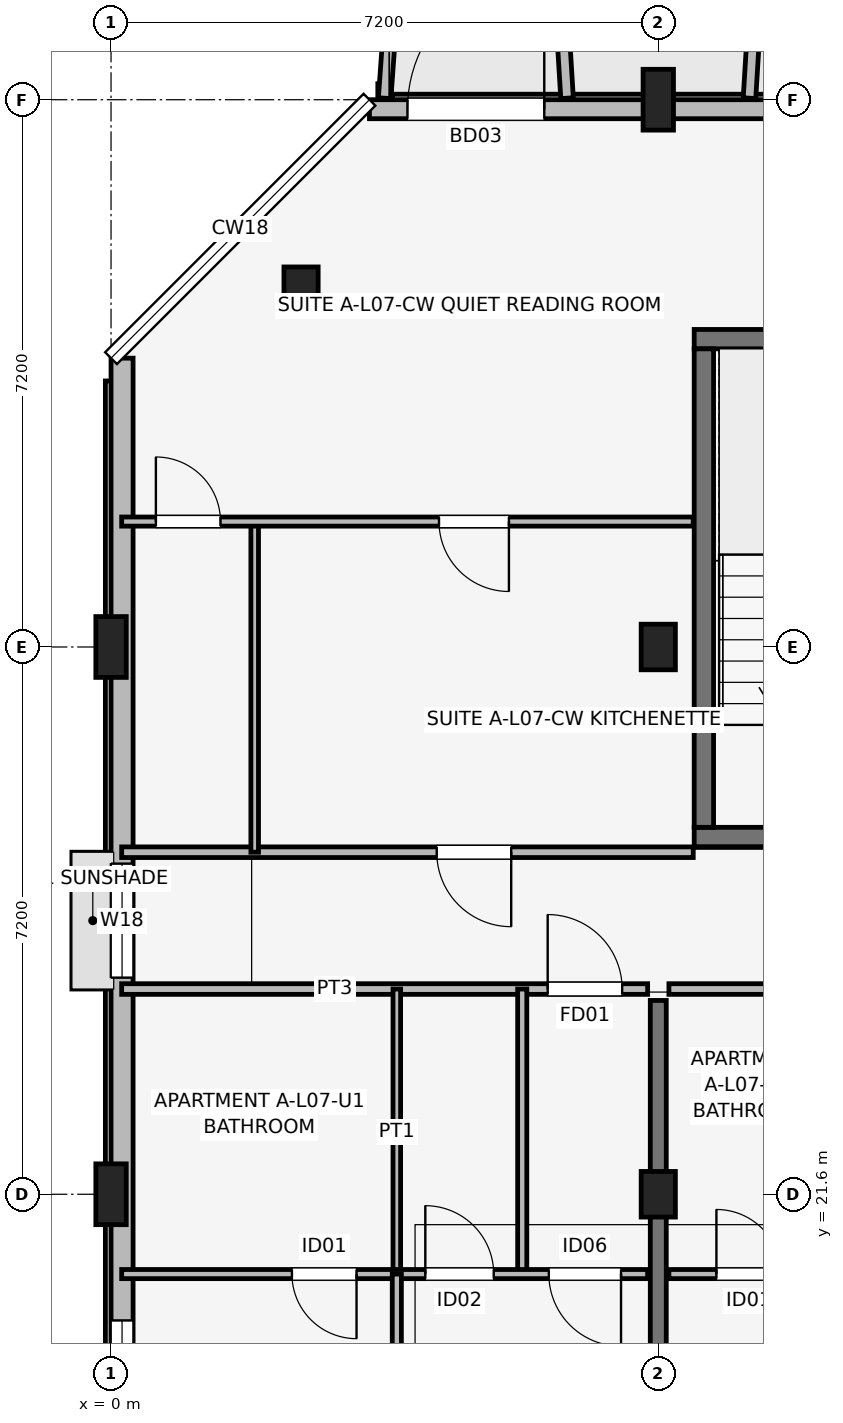
"""IFC4 building model, lengths in metres.
Left out: names, types, materials, properties, quantities, classifications, styles, units other than length and angle.
Written with IfcOpenShell. Run it as: python <this file> out.ifc"""

import sys

from ifc_helpers import new_model, si_unit, direction, frame, frame_2d, origin, origin_2d, place, context, subcontext, project, spatial, rectangle, extrude, element, fill, save


model = new_model("IFC4")
c1 = context("Model", 3, precision=1e-05, world=origin(), true_north=direction((0.0, 1.0)))
c2 = subcontext(c1, "Body", "Model", "MODEL_VIEW")
j1 = project(units=[si_unit("LENGTHUNIT", "METRE"), si_unit("PLANEANGLEUNIT", "RADIAN")], contexts=[c1])
p1 = place(None, origin())
s1 = spatial("IfcSite", under=j1, at=p1, CompositionType="ELEMENT")
p2 = place(p1, origin())
s2 = spatial("IfcBuilding", under=s1, at=p2, CompositionType="ELEMENT")
p3 = place(p2, frame((0.0, 0.0, 24.45)))
s3 = spatial("IfcBuildingStorey", under=s2, at=p3, CompositionType="ELEMENT", Elevation=24.45)
for number, where, z_axis, x_axis in (
    (1, (0.0, 21.6, 0.0), (0.0, 0.0, 1.0), (1.0, 0.0, 0.0)),
    (2, (0.0, 28.8, 0.0), (0.0, 0.0, 1.0), (1.0, 0.0, 0.0)),
):
    element("IfcColumn", number, at=place(p3, frame(where, z_axis=z_axis, x_axis=x_axis)), inside=s3, PredefinedType="COLUMN", context=c2, shape_type="SweptSolid", body=[
        extrude(rectangle(XDim=0.4, YDim=0.8, at=origin_2d()), origin(), (0.0, 0.0, 1.0), 3.15),
    ])
for number, where, z_axis, x_axis in (
    (3, (2.5, 33.5, 0.0), (0.0, 0.0, 1.0), (1.0, 0.0, 0.0)),
    (4, (7.2, 21.6, 0.0), (0.0, 0.0, 1.0), (1.0, 0.0, 0.0)),
    (5, (7.2, 28.8, 0.0), (0.0, 0.0, 1.0), (1.0, 0.0, 0.0)),
):
    element("IfcColumn", number, at=place(p3, frame(where, z_axis=z_axis, x_axis=x_axis)), inside=s3, PredefinedType="COLUMN", context=c2, shape_type="SweptSolid", body=[
        extrude(rectangle(XDim=0.45, YDim=0.6, at=origin_2d()), origin(), (0.0, 0.0, 1.0), 3.15),
    ])
p4 = place(p3, frame((7.2, 36.0, 0.0), z_axis=(0.0, 0.0, 1.0), x_axis=(1.0, 0.0, 0.0)))
e6 = element("IfcColumn", 6, at=p4, inside=s3, PredefinedType="COLUMN", context=c2, shape_type="SweptSolid", body=[
    extrude(rectangle(XDim=0.4, YDim=0.8, at=origin_2d()), origin(), (0.0, 0.0, 1.0), 3.15),
])
p5 = place(p3, frame((7.673, 26.3, 0.0), z_axis=(0.0, 0.0, 1.0), x_axis=(1.0, 0.0, 0.0)))
e7 = element("IfcWall", 7, at=p5, inside=s3, PredefinedType="SHEAR", context=c2, shape_type="SweptSolid", body=[
    extrude(rectangle(XDim=3.305, YDim=0.255, at=frame_2d((1.652, 0.0))), origin(), (0.0, 0.0, 1.0), 3.15),
])
p6 = place(p5, frame((2.177, 0.0, 0.0), z_axis=(0.0, 0.0, 1.0), x_axis=(-1.0, 0.0, 0.0)))
e8 = element("IfcOpeningElement", 8, at=p6, cuts=e7, PredefinedType="OPENING", context=c2, shape_type="SweptSolid", body=[
    extrude(rectangle(XDim=1.05, YDim=2.12, at=frame_2d((0.525, 1.06))), frame((0.0, 0.137, 0.0), z_axis=(0.0, -1.0, 0.0), x_axis=(1.0, 0.0, 0.0)), (0.0, 0.0, 1.0), 0.275),
])
p7 = place(p3, frame((7.673, 32.85, 0.0), z_axis=(0.0, 0.0, 1.0), x_axis=(1.0, 0.0, 0.0)))
e9 = element("IfcWall", 9, at=p7, inside=s3, PredefinedType="SHEAR", context=c2, shape_type="SweptSolid", body=[
    extrude(rectangle(XDim=3.305, YDim=0.255, at=frame_2d((1.652, 0.0))), origin(), (0.0, 0.0, 1.0), 3.15),
])
p8 = place(p3, frame((7.8, 26.427, 0.0), z_axis=(0.0, 0.0, 1.0), x_axis=(0.0, 1.0, 0.0)))
e10 = element("IfcWall", 10, at=p8, inside=s3, PredefinedType="SHEAR", context=c2, shape_type="SweptSolid", body=[
    extrude(rectangle(XDim=6.295, YDim=0.255, at=frame_2d((3.147, 0.0))), origin(), (0.0, 0.0, 1.0), 3.15),
])
p9 = place(p3, frame((7.2, 14.75, 0.0), z_axis=(0.0, 0.0, 1.0), x_axis=(0.0, 1.0, 0.0)))
e11 = element("IfcWall", 11, at=p9, inside=s3, PredefinedType="SHEAR", context=c2, shape_type="SweptSolid", body=[
    extrude(rectangle(XDim=9.4, YDim=0.21, at=frame_2d((4.7, 0.0))), origin(), (0.0, 0.0, 1.0), 3.15),
])
p10 = place(p3, frame((32.6, 35.875, 0.0), z_axis=(0.0, 0.0, 1.0), x_axis=(-1.0, 0.0, 0.0)))
e12 = element("IfcWall", 12, at=p10, inside=s3, PredefinedType="SOLIDWALL", context=c2, shape_type="SweptSolid", body=[
    extrude(rectangle(XDim=29.2, YDim=0.25, at=frame_2d((14.6, 0.0))), origin(), (0.0, 0.0, 1.0), 2.43),
])
p11 = place(p10, frame((28.7, 0.0, 0.0), z_axis=(0.0, 0.0, 1.0), x_axis=(-1.0, 0.0, 0.0)))
e13 = element("IfcOpeningElement", 13, at=p11, cuts=e12, PredefinedType="OPENING", context=c2, shape_type="SweptSolid", body=[
    extrude(rectangle(XDim=1.8, YDim=2.15, at=frame_2d((0.9, 1.075))), frame((0.0, 0.135, 0.0), z_axis=(0.0, -1.0, 0.0), x_axis=(1.0, 0.0, 0.0)), (0.0, 0.0, 1.0), 0.27),
])
p12 = place(p10, frame((2.15, 0.0, 0.0), z_axis=(0.0, 0.0, 1.0), x_axis=(-1.0, 0.0, 0.0)))
e14 = element("IfcOpeningElement", 14, at=p12, cuts=e12, PredefinedType="OPENING", context=c2, shape_type="SweptSolid", body=[
    extrude(rectangle(XDim=1.5, YDim=2.15, at=frame_2d((0.75, 1.075))), frame((0.0, 0.135, 0.0), z_axis=(0.0, -1.0, 0.0), x_axis=(1.0, 0.0, 0.0)), (0.0, 0.0, 1.0), 0.27),
])
p13 = place(p10, frame((14.955, 0.0, 0.5)))
e15 = element("IfcOpeningElement", 15, at=p13, cuts=e12, PredefinedType="OPENING", context=c2, shape_type="SweptSolid", body=[
    extrude(rectangle(XDim=0.9, YDim=1.8, at=frame_2d((0.45, 0.9))), frame((0.0, 0.135, 0.0), z_axis=(0.0, -1.0, 0.0), x_axis=(1.0, 0.0, 0.0)), (0.0, 0.0, 1.0), 0.27),
])
p14 = place(p10, frame((7.745, 0.0, 0.7)))
e16 = element("IfcOpeningElement", 16, at=p14, cuts=e12, PredefinedType="OPENING", context=c2, shape_type="SweptSolid", body=[
    extrude(rectangle(XDim=1.86, YDim=1.6, at=frame_2d((0.93, 0.8))), frame((0.0, 0.135, 0.0), z_axis=(0.0, -1.0, 0.0), x_axis=(1.0, 0.0, 0.0)), (0.0, 0.0, 1.0), 0.27),
])
p15 = place(p10, frame((19.57, 0.0, 0.7)))
e17 = element("IfcOpeningElement", 17, at=p15, cuts=e12, PredefinedType="OPENING", context=c2, shape_type="SweptSolid", body=[
    extrude(rectangle(XDim=1.86, YDim=1.6, at=frame_2d((0.93, 0.8))), frame((0.0, 0.135, 0.0), z_axis=(0.0, -1.0, 0.0), x_axis=(1.0, 0.0, 0.0)), (0.0, 0.0, 1.0), 0.27),
])
p16 = place(p3, frame((0.145, 32.6, 0.0), z_axis=(0.0, 0.0, 1.0), x_axis=(0.0, -1.0, 0.0)))
e18 = element("IfcWall", 18, at=p16, inside=s3, PredefinedType="SOLIDWALL", context=c2, shape_type="SweptSolid", body=[
    extrude(rectangle(XDim=14.8, YDim=0.29, at=frame_2d((7.4, 0.0))), origin(), (0.0, 0.0, 1.0), 2.43),
])
p17 = place(p16, frame((6.65, 0.0, 1.05)))
e19 = element("IfcOpeningElement", 19, at=p17, cuts=e18, PredefinedType="OPENING", context=c2, shape_type="SweptSolid", body=[
    extrude(rectangle(XDim=1.5, YDim=1.15, at=frame_2d((0.75, 0.575))), frame((0.0, 0.155, 0.0), z_axis=(0.0, -1.0, 0.0), x_axis=(1.0, 0.0, 0.0)), (0.0, 0.0, 1.0), 0.31),
])
p18 = place(p16, frame((12.66, 0.0, 0.75)))
e20 = element("IfcOpeningElement", 20, at=p18, cuts=e18, PredefinedType="OPENING", context=c2, shape_type="SweptSolid", body=[
    extrude(rectangle(XDim=1.3, YDim=1.55, at=frame_2d((0.65, 0.775))), frame((0.0, 0.155, 0.0), z_axis=(0.0, -1.0, 0.0), x_axis=(1.0, 0.0, 0.0)), (0.0, 0.0, 1.0), 0.31),
])
p19 = place(p3, frame((3.6, 36.02, 0.0), z_axis=(0.0, 0.0, 1.0), x_axis=(0.071194071069, 0.997462482625, 0.0)))
e21 = element("IfcWall", 21, at=p19, inside=s3, PredefinedType="ELEMENTEDWALL", context=c2, shape_type="SweptSolid", body=[
    extrude(rectangle(XDim=1.965, YDim=0.165, at=frame_2d((0.982, 0.0))), origin(), (0.0, 0.0, 1.0), 2.8),
])
p20 = place(p3, frame((6.0, 36.02, 0.0), z_axis=(0.0, 0.0, 1.0), x_axis=(-0.061170732449, 0.998127317276, 0.0)))
e22 = element("IfcWall", 22, at=p20, inside=s3, PredefinedType="ELEMENTEDWALL", context=c2, shape_type="SweptSolid", body=[
    extrude(rectangle(XDim=1.964, YDim=0.165, at=frame_2d((0.982, 0.0))), origin(), (0.0, 0.0, 1.0), 2.8),
])
p21 = place(p3, frame((8.4, 36.02, 0.0), z_axis=(0.0, 0.0, 1.0), x_axis=(0.061170732449, 0.998127317276, 0.0)))
e23 = element("IfcWall", 23, at=p21, inside=s3, PredefinedType="ELEMENTEDWALL", context=c2, shape_type="SweptSolid", body=[
    extrude(rectangle(XDim=1.964, YDim=0.165, at=frame_2d((0.982, 0.0))), origin(), (0.0, 0.0, 1.0), 2.53),
])
p22 = place(p3, frame((0.14, 24.3, 0.0), z_axis=(0.0, 0.0, 1.0), x_axis=(1.0, 0.0, 0.0)))
e24 = element("IfcWall", 24, at=p22, inside=s3, PredefinedType="PARTITIONING", context=c2, shape_type="SweptSolid", body=[
    extrude(rectangle(XDim=6.92, YDim=0.14, at=frame_2d((3.46, 0.0))), origin(), (0.0, 0.0, 1.0), 2.38),
])
p23 = place(p22, frame((5.605, 0.0, 0.0)))
e25 = element("IfcOpeningElement", 25, at=p23, cuts=e24, PredefinedType="OPENING", context=c2, shape_type="SweptSolid", body=[
    extrude(rectangle(XDim=0.98, YDim=2.1, at=frame_2d((0.49, 1.05))), frame((0.0, 0.08, 0.0), z_axis=(0.0, -1.0, 0.0), x_axis=(1.0, 0.0, 0.0)), (0.0, 0.0, 1.0), 0.16),
])
p24 = place(p3, frame((3.76, 20.55, 0.0), z_axis=(0.0, 0.0, 1.0), x_axis=(0.0, 1.0, 0.0)))
e26 = element("IfcWall", 26, at=p24, inside=s3, PredefinedType="PARTITIONING", context=c2, shape_type="SweptSolid", body=[
    extrude(rectangle(XDim=3.75, YDim=0.1, at=frame_2d((1.875, 0.0))), origin(), (0.0, 0.0, 1.0), 2.38),
])
p25 = place(p3, frame((5.41, 20.55, 0.0), z_axis=(0.0, 0.0, 1.0), x_axis=(0.0, 1.0, 0.0)))
e27 = element("IfcWall", 27, at=p25, inside=s3, PredefinedType="PARTITIONING", context=c2, shape_type="SweptSolid", body=[
    extrude(rectangle(XDim=3.75, YDim=0.12, at=frame_2d((1.875, 0.0))), origin(), (0.0, 0.0, 1.0), 2.38),
])
p26 = place(p3, frame((0.14, 20.55, 0.0), z_axis=(0.0, 0.0, 1.0), x_axis=(1.0, 0.0, 0.0)))
e28 = element("IfcWall", 28, at=p26, inside=s3, PredefinedType="PARTITIONING", context=c2, shape_type="SweptSolid", body=[
    extrude(rectangle(XDim=6.92, YDim=0.12, at=frame_2d((3.46, 0.0))), origin(), (0.0, 0.0, 1.0), 2.38),
])
p27 = place(p26, frame((3.09, 0.0, 0.0), z_axis=(0.0, 0.0, 1.0), x_axis=(-1.0, 0.0, 0.0)))
e29 = element("IfcOpeningElement", 29, at=p27, cuts=e28, PredefinedType="OPENING", context=c2, shape_type="SweptSolid", body=[
    extrude(rectangle(XDim=0.85, YDim=2.08, at=frame_2d((0.425, 1.04))), frame((0.0, 0.07, 0.0), z_axis=(0.0, -1.0, 0.0), x_axis=(1.0, 0.0, 0.0)), (0.0, 0.0, 1.0), 0.14),
])
p28 = place(p26, frame((3.995, 0.0, 0.0)))
e30 = element("IfcOpeningElement", 30, at=p28, cuts=e28, PredefinedType="OPENING", context=c2, shape_type="SweptSolid", body=[
    extrude(rectangle(XDim=0.9, YDim=2.08, at=frame_2d((0.45, 1.04))), frame((0.0, 0.07, 0.0), z_axis=(0.0, -1.0, 0.0), x_axis=(1.0, 0.0, 0.0)), (0.0, 0.0, 1.0), 0.14),
])
p29 = place(p26, frame((6.57, 0.0, 0.0), z_axis=(0.0, 0.0, 1.0), x_axis=(-1.0, 0.0, 0.0)))
e31 = element("IfcOpeningElement", 31, at=p29, cuts=e28, PredefinedType="OPENING", context=c2, shape_type="SweptSolid", body=[
    extrude(rectangle(XDim=0.95, YDim=2.08, at=frame_2d((0.475, 1.04))), frame((0.0, 0.07, 0.0), z_axis=(0.0, -1.0, 0.0), x_axis=(1.0, 0.0, 0.0)), (0.0, 0.0, 1.0), 0.14),
])
p30 = place(p3, frame((3.76, 14.7, 0.0), z_axis=(0.0, 0.0, 1.0), x_axis=(0.0, 1.0, 0.0)))
e32 = element("IfcWall", 32, at=p30, inside=s3, PredefinedType="PARTITIONING", context=c2, shape_type="SweptSolid", body=[
    extrude(rectangle(XDim=5.85, YDim=0.12, at=frame_2d((2.925, 0.0))), origin(), (0.0, 0.0, 1.0), 2.38),
])
p31 = place(p30, frame((2.475, 0.0, 0.0)))
e33 = element("IfcOpeningElement", 33, at=p31, cuts=e32, PredefinedType="OPENING", context=c2, shape_type="SweptSolid", body=[
    extrude(rectangle(XDim=0.9, YDim=2.08, at=frame_2d((0.45, 1.04))), frame((0.0, 0.07, 0.0), z_axis=(0.0, -1.0, 0.0), x_axis=(1.0, 0.0, 0.0)), (0.0, 0.0, 1.0), 0.14),
])
p32 = place(p3, frame((7.34, 24.3, 0.0), z_axis=(0.0, 0.0, 1.0), x_axis=(1.0, 0.0, 0.0)))
e34 = element("IfcWall", 34, at=p32, inside=s3, PredefinedType="PARTITIONING", context=c2, shape_type="SweptSolid", body=[
    extrude(rectangle(XDim=6.92, YDim=0.14, at=frame_2d((3.46, 0.0))), origin(), (0.0, 0.0, 1.0), 2.38),
])
p33 = place(p32, frame((6.125, 0.0, 0.0), z_axis=(0.0, 0.0, 1.0), x_axis=(-1.0, 0.0, 0.0)))
e35 = element("IfcOpeningElement", 35, at=p33, cuts=e34, PredefinedType="OPENING", context=c2, shape_type="SweptSolid", body=[
    extrude(rectangle(XDim=0.98, YDim=2.1, at=frame_2d((0.49, 1.05))), frame((0.0, 0.08, 0.0), z_axis=(0.0, -1.0, 0.0), x_axis=(1.0, 0.0, 0.0)), (0.0, 0.0, 1.0), 0.16),
])
p34 = place(p3, frame((7.34, 20.55, 0.0), z_axis=(0.0, 0.0, 1.0), x_axis=(1.0, 0.0, 0.0)))
e36 = element("IfcWall", 36, at=p34, inside=s3, PredefinedType="PARTITIONING", context=c2, shape_type="SweptSolid", body=[
    extrude(rectangle(XDim=6.92, YDim=0.12, at=frame_2d((3.46, 0.0))), origin(), (0.0, 0.0, 1.0), 2.38),
])
p35 = place(p34, frame((0.625, 0.0, 0.0)))
e37 = element("IfcOpeningElement", 37, at=p35, cuts=e36, PredefinedType="OPENING", context=c2, shape_type="SweptSolid", body=[
    extrude(rectangle(XDim=0.85, YDim=2.08, at=frame_2d((0.425, 1.04))), frame((0.0, 0.07, 0.0), z_axis=(0.0, -1.0, 0.0), x_axis=(1.0, 0.0, 0.0)), (0.0, 0.0, 1.0), 0.14),
])
p36 = place(p34, frame((3.675, 0.0, 0.0), z_axis=(0.0, 0.0, 1.0), x_axis=(-1.0, 0.0, 0.0)))
e38 = element("IfcOpeningElement", 38, at=p36, cuts=e36, PredefinedType="OPENING", context=c2, shape_type="SweptSolid", body=[
    extrude(rectangle(XDim=0.9, YDim=2.08, at=frame_2d((0.45, 1.04))), frame((0.0, 0.07, 0.0), z_axis=(0.0, -1.0, 0.0), x_axis=(1.0, 0.0, 0.0)), (0.0, 0.0, 1.0), 0.14),
])
p37 = place(p34, frame((5.16, 0.0, 0.0)))
e39 = element("IfcOpeningElement", 39, at=p37, cuts=e36, PredefinedType="OPENING", context=c2, shape_type="SweptSolid", body=[
    extrude(rectangle(XDim=0.95, YDim=2.08, at=frame_2d((0.475, 1.04))), frame((0.0, 0.07, 0.0), z_axis=(0.0, -1.0, 0.0), x_axis=(1.0, 0.0, 0.0)), (0.0, 0.0, 1.0), 0.14),
])
p38 = place(p3, frame((0.14, 26.1, 0.0), z_axis=(0.0, 0.0, 1.0), x_axis=(1.0, 0.0, 0.0)))
e40 = element("IfcWall", 40, at=p38, inside=s3, PredefinedType="PARTITIONING", context=c2, shape_type="SweptSolid", body=[
    extrude(rectangle(XDim=7.52, YDim=0.14, at=frame_2d((3.76, 0.0))), origin(), (0.0, 0.0, 1.0), 2.38),
])
p39 = place(p38, frame((5.125, 0.0, 0.0), z_axis=(0.0, 0.0, 1.0), x_axis=(-1.0, 0.0, 0.0)))
e41 = element("IfcOpeningElement", 41, at=p39, cuts=e40, PredefinedType="OPENING", context=c2, shape_type="SweptSolid", body=[
    extrude(rectangle(XDim=0.98, YDim=2.1, at=frame_2d((0.49, 1.05))), frame((0.0, 0.08, 0.0), z_axis=(0.0, -1.0, 0.0), x_axis=(1.0, 0.0, 0.0)), (0.0, 0.0, 1.0), 0.16),
])
p40 = place(p3, frame((1.89, 26.1, 0.0), z_axis=(0.0, 0.0, 1.0), x_axis=(0.0, 1.0, 0.0)))
e42 = element("IfcWall", 42, at=p40, inside=s3, PredefinedType="PARTITIONING", context=c2, shape_type="SweptSolid", body=[
    extrude(rectangle(XDim=4.35, YDim=0.1, at=frame_2d((2.175, 0.0))), origin(), (0.0, 0.0, 1.0), 2.38),
])
p41 = place(p3, frame((0.14, 30.45, 0.0), z_axis=(0.0, 0.0, 1.0), x_axis=(1.0, 0.0, 0.0)))
e43 = element("IfcWall", 43, at=p41, inside=s3, PredefinedType="PARTITIONING", context=c2, shape_type="SweptSolid", body=[
    extrude(rectangle(XDim=7.52, YDim=0.12, at=frame_2d((3.76, 0.0))), origin(), (0.0, 0.0, 1.0), 2.38),
])
p42 = place(p41, frame((0.45, 0.0, 0.0)))
e44 = element("IfcOpeningElement", 44, at=p42, cuts=e43, PredefinedType="OPENING", context=c2, shape_type="SweptSolid", body=[
    extrude(rectangle(XDim=0.85, YDim=2.08, at=frame_2d((0.425, 1.04))), frame((0.0, 0.07, 0.0), z_axis=(0.0, -1.0, 0.0), x_axis=(1.0, 0.0, 0.0)), (0.0, 0.0, 1.0), 0.14),
])
p43 = place(p41, frame((5.095, 0.0, 0.0), z_axis=(0.0, 0.0, 1.0), x_axis=(-1.0, 0.0, 0.0)))
e45 = element("IfcOpeningElement", 45, at=p43, cuts=e43, PredefinedType="OPENING", context=c2, shape_type="SweptSolid", body=[
    extrude(rectangle(XDim=0.92, YDim=2.08, at=frame_2d((0.46, 1.04))), frame((0.0, 0.07, 0.0), z_axis=(0.0, -1.0, 0.0), x_axis=(1.0, 0.0, 0.0)), (0.0, 0.0, 1.0), 0.14),
])
p44 = place(p11, origin())
e46 = element("IfcDoor", 46, at=p44, inside=s3, OperationType="SINGLE_SWING_LEFT", PredefinedType="DOOR", context=c2, shape_type="SweptSolid", body=[
    extrude(rectangle(XDim=1.8, YDim=2.15, at=frame_2d((0.9, 1.075))), frame((0.0, 0.025, 0.0), z_axis=(0.0, -1.0, 0.0), x_axis=(1.0, 0.0, 0.0)), (0.0, 0.0, 1.0), 0.05),
])
fill(e13, e46)
p45 = place(p17, origin())
e47 = element("IfcWindow", 47, at=p45, inside=s3, PartitioningType="SINGLE_PANEL", PredefinedType="WINDOW", context=c2, shape_type="SweptSolid", body=[
    extrude(rectangle(XDim=1.5, YDim=1.15, at=frame_2d((0.75, 0.575))), frame((0.0, 0.03, 0.0), z_axis=(0.0, -1.0, 0.0), x_axis=(1.0, 0.0, 0.0)), (0.0, 0.0, 1.0), 0.06),
])
fill(e19, e47)
p46 = place(p18, origin())
e48 = element("IfcWindow", 48, at=p46, inside=s3, PartitioningType="SINGLE_PANEL", PredefinedType="WINDOW", context=c2, shape_type="SweptSolid", body=[
    extrude(rectangle(XDim=1.3, YDim=1.55, at=frame_2d((0.65, 0.775))), frame((0.0, 0.03, 0.0), z_axis=(0.0, -1.0, 0.0), x_axis=(1.0, 0.0, 0.0)), (0.0, 0.0, 1.0), 0.06),
])
fill(e20, e48)
p47 = place(p23, origin())
e49 = element("IfcDoor", 49, at=p47, inside=s3, OperationType="SINGLE_SWING_LEFT", PredefinedType="DOOR", context=c2, shape_type="SweptSolid", body=[
    extrude(rectangle(XDim=0.98, YDim=2.1, at=frame_2d((0.49, 1.05))), frame((0.0, 0.025, 0.0), z_axis=(0.0, -1.0, 0.0), x_axis=(1.0, 0.0, 0.0)), (0.0, 0.0, 1.0), 0.05),
])
fill(e25, e49)
p48 = place(p27, origin())
e50 = element("IfcDoor", 50, at=p48, inside=s3, OperationType="SINGLE_SWING_RIGHT", PredefinedType="DOOR", context=c2, shape_type="SweptSolid", body=[
    extrude(rectangle(XDim=0.85, YDim=2.08, at=frame_2d((0.425, 1.04))), frame((0.0, 0.025, 0.0), z_axis=(0.0, -1.0, 0.0), x_axis=(1.0, 0.0, 0.0)), (0.0, 0.0, 1.0), 0.05),
])
fill(e29, e50)
p49 = place(p28, origin())
e51 = element("IfcDoor", 51, at=p49, inside=s3, OperationType="SINGLE_SWING_LEFT", PredefinedType="DOOR", context=c2, shape_type="SweptSolid", body=[
    extrude(rectangle(XDim=0.9, YDim=2.08, at=frame_2d((0.45, 1.04))), frame((0.0, 0.025, 0.0), z_axis=(0.0, -1.0, 0.0), x_axis=(1.0, 0.0, 0.0)), (0.0, 0.0, 1.0), 0.05),
])
fill(e30, e51)
p50 = place(p29, origin())
e52 = element("IfcDoor", 52, at=p50, inside=s3, OperationType="SINGLE_SWING_RIGHT", PredefinedType="DOOR", context=c2, shape_type="SweptSolid", body=[
    extrude(rectangle(XDim=0.95, YDim=2.08, at=frame_2d((0.475, 1.04))), frame((0.0, 0.025, 0.0), z_axis=(0.0, -1.0, 0.0), x_axis=(1.0, 0.0, 0.0)), (0.0, 0.0, 1.0), 0.05),
])
fill(e31, e52)
p51 = place(p35, origin())
e53 = element("IfcDoor", 53, at=p51, inside=s3, OperationType="SINGLE_SWING_LEFT", PredefinedType="DOOR", context=c2, shape_type="SweptSolid", body=[
    extrude(rectangle(XDim=0.85, YDim=2.08, at=frame_2d((0.425, 1.04))), frame((0.0, 0.025, 0.0), z_axis=(0.0, -1.0, 0.0), x_axis=(1.0, 0.0, 0.0)), (0.0, 0.0, 1.0), 0.05),
])
fill(e37, e53)
p52 = place(p39, origin())
e54 = element("IfcDoor", 54, at=p52, inside=s3, OperationType="SINGLE_SWING_RIGHT", PredefinedType="DOOR", context=c2, shape_type="SweptSolid", body=[
    extrude(rectangle(XDim=0.98, YDim=2.1, at=frame_2d((0.49, 1.05))), frame((0.0, 0.025, 0.0), z_axis=(0.0, -1.0, 0.0), x_axis=(1.0, 0.0, 0.0)), (0.0, 0.0, 1.0), 0.05),
])
fill(e41, e54)
p53 = place(p42, origin())
e55 = element("IfcDoor", 55, at=p53, inside=s3, OperationType="SINGLE_SWING_LEFT", PredefinedType="DOOR", context=c2, shape_type="SweptSolid", body=[
    extrude(rectangle(XDim=0.85, YDim=2.08, at=frame_2d((0.425, 1.04))), frame((0.0, 0.025, 0.0), z_axis=(0.0, -1.0, 0.0), x_axis=(1.0, 0.0, 0.0)), (0.0, 0.0, 1.0), 0.05),
])
fill(e44, e55)
p54 = place(p43, origin())
e56 = element("IfcDoor", 56, at=p54, inside=s3, OperationType="SINGLE_SWING_RIGHT", PredefinedType="DOOR", context=c2, shape_type="SweptSolid", body=[
    extrude(rectangle(XDim=0.92, YDim=2.08, at=frame_2d((0.46, 1.04))), frame((0.0, 0.025, 0.0), z_axis=(0.0, -1.0, 0.0), x_axis=(1.0, 0.0, 0.0)), (0.0, 0.0, 1.0), 0.05),
])
fill(e45, e56)
save(model, sys.argv[1])
